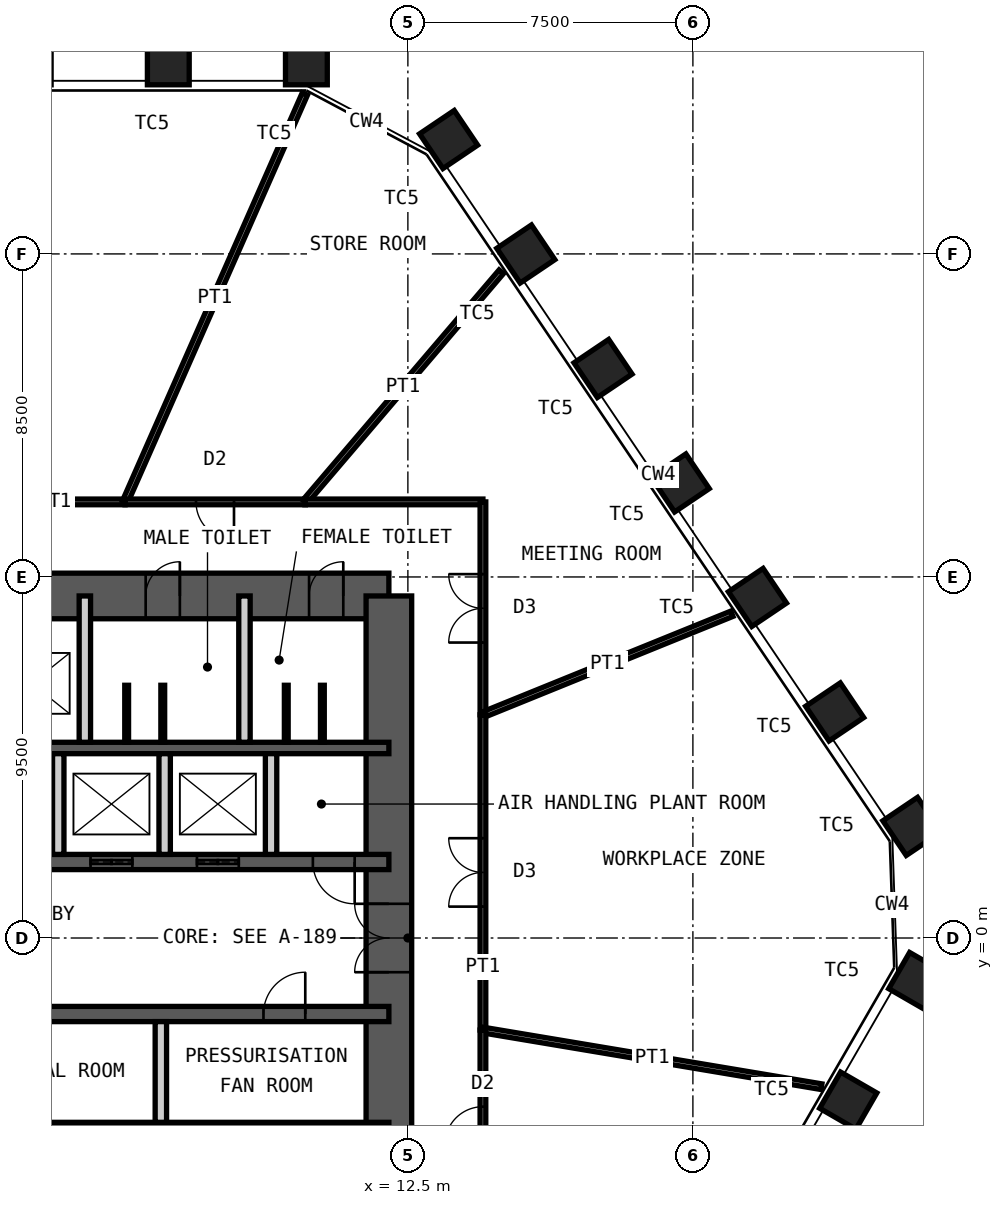
"""IFC4 building model, lengths in metres.
Left out: names, types, materials, properties, quantities, classifications, styles, units other than length and angle.
Written with IfcOpenShell. Run it as: python <this file> out.ifc"""

import sys

from ifc_helpers import new_model, si_unit, direction, frame, frame_2d, origin, origin_2d, place, context, subcontext, project, spatial, rectangle, hollow_rectangle, extrude, element, fill, save


model = new_model("IFC4")
c1 = context("Model", 3, precision=1e-05, world=origin(), true_north=direction((0.0, 1.0)))
c2 = subcontext(c1, "Body", "Model", "MODEL_VIEW")
j1 = project(units=[si_unit("LENGTHUNIT", "METRE"), si_unit("PLANEANGLEUNIT", "RADIAN")], contexts=[c1])
p1 = place(None, origin())
s1 = spatial("IfcSite", under=j1, at=p1, CompositionType="ELEMENT")
p2 = place(p1, origin())
s2 = spatial("IfcBuilding", under=s1, at=p2, CompositionType="ELEMENT")
p3 = place(p2, frame((0.0, 0.0, 184.6)))
s3 = spatial("IfcBuildingStorey", under=s2, at=p3, CompositionType="ELEMENT", Elevation=184.6)
for number, where, z_axis, x_axis in (
    (1, (6.196, 23.0, 0.0), (0.0, 0.0, 1.0), (-1.0, 0.0, 0.0)),
    (2, (9.829, 23.0, 0.0), (0.0, 0.0, 1.0), (-1.0, 0.0, 0.0)),
    (3, (13.571, 21.01, 0.0), (0.0, 0.0, 1.0), (-0.559, 0.829, 0.0)),
    (4, (15.603, 17.998, 0.0), (0.0, 0.0, 1.0), (-0.559, 0.829, 0.0)),
    (5, (17.635, 14.986, 0.0), (0.0, 0.0, 1.0), (-0.559, 0.829, 0.0)),
    (6, (19.667, 11.973, 0.0), (0.0, 0.0, 1.0), (-0.559, 0.829, 0.0)),
    (7, (21.699, 8.961, 0.0), (0.0, 0.0, 1.0), (-0.559, 0.829, 0.0)),
    (8, (23.731, 5.948, 0.0), (0.0, 0.0, 1.0), (-0.559, 0.829, 0.0)),
    (9, (25.762, 2.936, 0.0), (0.0, 0.0, 1.0), (-0.559, 0.829, 0.0)),
    (10, (25.905, -1.132, 0.0), (0.0, 0.0, 1.0), (0.5, 0.866, 0.0)),
    (11, (24.088, -4.279, 0.0), (0.0, 0.0, 1.0), (0.5, 0.866, 0.0)),
):
    element("IfcColumn", number, at=place(p3, frame(where, z_axis=z_axis, x_axis=x_axis)), inside=s3, PredefinedType="COLUMN", context=c2, shape_type="SweptSolid", body=[
        extrude(hollow_rectangle(XDim=1.1, YDim=1.1, WallThickness=0.07, at=origin_2d()), origin(), (0.0, 0.0, 1.0), 4.2),
    ])
p4 = place(p3, frame((-12.0, 9.0, 0.0), z_axis=(0.0, 0.0, 1.0), x_axis=(1.0, 0.0, 0.0)))
e12 = element("IfcWall", 12, at=p4, inside=s3, PredefinedType="SHEAR", context=c2, shape_type="SweptSolid", body=[
    extrude(rectangle(XDim=24.0, YDim=1.2, at=frame_2d((12.0, 0.0))), origin(), (0.0, 0.0, 1.0), 4.2),
])
p5 = place(p4, frame((10.4, 0.0, 0.0)))
e13 = element("IfcOpeningElement", 13, at=p5, cuts=e12, PredefinedType="OPENING", context=c2, shape_type="SweptSolid", body=[
    extrude(rectangle(XDim=1.0, YDim=2.1, at=frame_2d((0.5, 1.05))), frame((0.0, 0.61, 0.0), z_axis=(0.0, -1.0, 0.0), x_axis=(1.0, 0.0, 0.0)), (0.0, 0.0, 1.0), 1.22),
])
p6 = place(p4, frame((17.6, 0.0, 0.0)))
e14 = element("IfcOpeningElement", 14, at=p6, cuts=e12, PredefinedType="OPENING", context=c2, shape_type="SweptSolid", body=[
    extrude(rectangle(XDim=0.9, YDim=2.1, at=frame_2d((0.45, 1.05))), frame((0.0, 0.61, 0.0), z_axis=(0.0, -1.0, 0.0), x_axis=(1.0, 0.0, 0.0)), (0.0, 0.0, 1.0), 1.22),
])
p7 = place(p4, frame((21.9, 0.0, 0.0)))
e15 = element("IfcOpeningElement", 15, at=p7, cuts=e12, PredefinedType="OPENING", context=c2, shape_type="SweptSolid", body=[
    extrude(rectangle(XDim=0.9, YDim=2.1, at=frame_2d((0.45, 1.05))), frame((0.0, 0.61, 0.0), z_axis=(0.0, -1.0, 0.0), x_axis=(1.0, 0.0, 0.0)), (0.0, 0.0, 1.0), 1.22),
])
p8 = place(p3, frame((12.0, -9.0, 0.0), z_axis=(0.0, 0.0, 1.0), x_axis=(0.0, 1.0, 0.0)))
e16 = element("IfcWall", 16, at=p8, inside=s3, PredefinedType="SHEAR", context=c2, shape_type="SweptSolid", body=[
    extrude(rectangle(XDim=18.0, YDim=1.2, at=frame_2d((9.0, 0.0))), origin(), (0.0, 0.0, 1.0), 4.2),
])
p9 = place(p8, frame((8.1, 0.0, 0.0)))
e17 = element("IfcOpeningElement", 17, at=p9, cuts=e16, PredefinedType="OPENING", context=c2, shape_type="SweptSolid", body=[
    extrude(rectangle(XDim=1.8, YDim=2.1, at=frame_2d((0.9, 1.05))), frame((0.0, 0.61, 0.0), z_axis=(0.0, -1.0, 0.0), x_axis=(1.0, 0.0, 0.0)), (0.0, 0.0, 1.0), 1.22),
])
p10 = place(p3, frame((-12.0, 5.0, 0.0), z_axis=(0.0, 0.0, 1.0), x_axis=(1.0, 0.0, 0.0)))
e18 = element("IfcWall", 18, at=p10, inside=s3, PredefinedType="SHEAR", context=c2, shape_type="SweptSolid", body=[
    extrude(rectangle(XDim=24.0, YDim=0.3, at=frame_2d((12.0, 0.0))), origin(), (0.0, 0.0, 1.0), 4.2),
])
p11 = place(p3, frame((-12.0, 2.0, 0.0), z_axis=(0.0, 0.0, 1.0), x_axis=(1.0, 0.0, 0.0)))
e19 = element("IfcWall", 19, at=p11, inside=s3, PredefinedType="SHEAR", context=c2, shape_type="SweptSolid", body=[
    extrude(rectangle(XDim=24.0, YDim=0.4, at=frame_2d((12.0, 0.0))), origin(), (0.0, 0.0, 1.0), 4.2),
])
p12 = place(p11, frame((2.4, 0.0, 0.0)))
e20 = element("IfcOpeningElement", 20, at=p12, cuts=e19, PredefinedType="OPENING", context=c2, shape_type="SweptSolid", body=[
    extrude(rectangle(XDim=1.1, YDim=2.1, at=frame_2d((0.55, 1.05))), frame((0.0, 0.21, 0.0), z_axis=(0.0, -1.0, 0.0), x_axis=(1.0, 0.0, 0.0)), (0.0, 0.0, 1.0), 0.42),
])
p13 = place(p11, frame((22.0, 0.0, 0.0)))
e21 = element("IfcOpeningElement", 21, at=p13, cuts=e19, PredefinedType="OPENING", context=c2, shape_type="SweptSolid", body=[
    extrude(rectangle(XDim=1.1, YDim=2.1, at=frame_2d((0.55, 1.05))), frame((0.0, 0.21, 0.0), z_axis=(0.0, -1.0, 0.0), x_axis=(1.0, 0.0, 0.0)), (0.0, 0.0, 1.0), 0.42),
])
p14 = place(p11, frame((10.15, 0.0, 0.0)))
e22 = element("IfcOpeningElement", 22, at=p14, cuts=e19, PredefinedType="OPENING", context=c2, shape_type="SweptSolid", body=[
    extrude(rectangle(XDim=1.0, YDim=2.1, at=frame_2d((0.5, 1.05))), frame((0.0, 0.21, 0.0), z_axis=(0.0, -1.0, 0.0), x_axis=(1.0, 0.0, 0.0)), (0.0, 0.0, 1.0), 0.42),
])
p15 = place(p11, frame((6.9, 0.0, 0.0)))
e23 = element("IfcOpeningElement", 23, at=p15, cuts=e19, PredefinedType="OPENING", context=c2, shape_type="SweptSolid", body=[
    extrude(rectangle(XDim=1.0, YDim=2.1, at=frame_2d((0.5, 1.05))), frame((0.0, 0.21, 0.0), z_axis=(0.0, -1.0, 0.0), x_axis=(1.0, 0.0, 0.0)), (0.0, 0.0, 1.0), 0.42),
])
p16 = place(p11, frame((13.35, 0.0, 0.0)))
e24 = element("IfcOpeningElement", 24, at=p16, cuts=e19, PredefinedType="OPENING", context=c2, shape_type="SweptSolid", body=[
    extrude(rectangle(XDim=1.1, YDim=2.4, at=frame_2d((0.55, 1.2))), frame((0.0, 0.21, 0.0), z_axis=(0.0, -1.0, 0.0), x_axis=(1.0, 0.0, 0.0)), (0.0, 0.0, 1.0), 0.42),
])
p17 = place(p11, frame((16.15, 0.0, 0.0)))
e25 = element("IfcOpeningElement", 25, at=p17, cuts=e19, PredefinedType="OPENING", context=c2, shape_type="SweptSolid", body=[
    extrude(rectangle(XDim=1.1, YDim=2.4, at=frame_2d((0.55, 1.2))), frame((0.0, 0.21, 0.0), z_axis=(0.0, -1.0, 0.0), x_axis=(1.0, 0.0, 0.0)), (0.0, 0.0, 1.0), 0.42),
])
p18 = place(p11, frame((18.95, 0.0, 0.0)))
e26 = element("IfcOpeningElement", 26, at=p18, cuts=e19, PredefinedType="OPENING", context=c2, shape_type="SweptSolid", body=[
    extrude(rectangle(XDim=1.1, YDim=2.4, at=frame_2d((0.55, 1.2))), frame((0.0, 0.21, 0.0), z_axis=(0.0, -1.0, 0.0), x_axis=(1.0, 0.0, 0.0)), (0.0, 0.0, 1.0), 0.42),
])
p19 = place(p3, frame((-12.0, -2.0, 0.0), z_axis=(0.0, 0.0, 1.0), x_axis=(1.0, 0.0, 0.0)))
e27 = element("IfcWall", 27, at=p19, inside=s3, PredefinedType="SHEAR", context=c2, shape_type="SweptSolid", body=[
    extrude(rectangle(XDim=24.0, YDim=0.4, at=frame_2d((12.0, 0.0))), origin(), (0.0, 0.0, 1.0), 4.2),
])
p20 = place(p19, frame((1.1, 0.0, 0.0)))
e28 = element("IfcOpeningElement", 28, at=p20, cuts=e27, PredefinedType="OPENING", context=c2, shape_type="SweptSolid", body=[
    extrude(rectangle(XDim=1.1, YDim=2.1, at=frame_2d((0.55, 1.05))), frame((0.0, 0.21, 0.0), z_axis=(0.0, -1.0, 0.0), x_axis=(1.0, 0.0, 0.0)), (0.0, 0.0, 1.0), 0.42),
])
p21 = place(p19, frame((13.55, 0.0, 0.0)))
e29 = element("IfcOpeningElement", 29, at=p21, cuts=e27, PredefinedType="OPENING", context=c2, shape_type="SweptSolid", body=[
    extrude(rectangle(XDim=1.1, YDim=2.1, at=frame_2d((0.55, 1.05))), frame((0.0, 0.21, 0.0), z_axis=(0.0, -1.0, 0.0), x_axis=(1.0, 0.0, 0.0)), (0.0, 0.0, 1.0), 0.42),
])
p22 = place(p19, frame((20.7, 0.0, 0.0)))
e30 = element("IfcOpeningElement", 30, at=p22, cuts=e27, PredefinedType="OPENING", context=c2, shape_type="SweptSolid", body=[
    extrude(rectangle(XDim=1.1, YDim=2.1, at=frame_2d((0.55, 1.05))), frame((0.0, 0.21, 0.0), z_axis=(0.0, -1.0, 0.0), x_axis=(1.0, 0.0, 0.0)), (0.0, 0.0, 1.0), 0.42),
])
p23 = place(p19, frame((4.0, 0.0, 0.0)))
e31 = element("IfcOpeningElement", 31, at=p23, cuts=e27, PredefinedType="OPENING", context=c2, shape_type="SweptSolid", body=[
    extrude(rectangle(XDim=1.0, YDim=2.1, at=frame_2d((0.5, 1.05))), frame((0.0, 0.21, 0.0), z_axis=(0.0, -1.0, 0.0), x_axis=(1.0, 0.0, 0.0)), (0.0, 0.0, 1.0), 0.42),
])
p24 = place(p3, frame((-12.0, -5.0, 0.0), z_axis=(0.0, 0.0, 1.0), x_axis=(1.0, 0.0, 0.0)))
e32 = element("IfcWall", 32, at=p24, inside=s3, PredefinedType="SHEAR", context=c2, shape_type="SweptSolid", body=[
    extrude(rectangle(XDim=24.0, YDim=0.3, at=frame_2d((12.0, 0.0))), origin(), (0.0, 0.0, 1.0), 4.2),
])
for number, where, z_axis, x_axis in (
    (33, (4.0, 5.15, 0.0), (0.0, 0.0, 1.0), (0.0, 1.0, 0.0)),
    (34, (8.2, 5.15, 0.0), (0.0, 0.0, 1.0), (0.0, 1.0, 0.0)),
):
    element("IfcWall", number, at=place(p3, frame(where, z_axis=z_axis, x_axis=x_axis)), inside=s3, PredefinedType="PARTITIONING", context=c2, shape_type="SweptSolid", body=[
        extrude(rectangle(XDim=3.85, YDim=0.3, at=frame_2d((1.925, 0.0))), origin(), (0.0, 0.0, 1.0), 3.98),
    ])
for number, where, z_axis, x_axis in (
    (35, (3.3, 2.2, 0.0), (0.0, 0.0, 1.0), (0.0, 1.0, 0.0)),
    (36, (6.1, 2.2, 0.0), (0.0, 0.0, 1.0), (0.0, 1.0, 0.0)),
    (37, (8.9, 2.2, 0.0), (0.0, 0.0, 1.0), (0.0, 1.0, 0.0)),
    (38, (6.0, -4.85, 0.0), (0.0, 0.0, 1.0), (0.0, 1.0, 0.0)),
):
    element("IfcWall", number, at=place(p3, frame(where, z_axis=z_axis, x_axis=x_axis)), inside=s3, PredefinedType="PARTITIONING", context=c2, shape_type="SweptSolid", body=[
        extrude(rectangle(XDim=2.65, YDim=0.3, at=frame_2d((1.325, 0.0))), origin(), (0.0, 0.0, 1.0), 3.98),
    ])
for number, where, z_axis, x_axis in (
    (39, (5.1, 5.15, 0.0), (0.0, 0.0, 1.0), (0.0, 1.0, 0.0)),
    (40, (6.05, 5.15, 0.0), (0.0, 0.0, 1.0), (0.0, 1.0, 0.0)),
    (41, (9.3, 5.15, 0.0), (0.0, 0.0, 1.0), (0.0, 1.0, 0.0)),
    (42, (10.25, 5.15, 0.0), (0.0, 0.0, 1.0), (0.0, 1.0, 0.0)),
):
    element("IfcWall", number, at=place(p3, frame(where, z_axis=z_axis, x_axis=x_axis)), inside=s3, PredefinedType="PARTITIONING", context=c2, shape_type="SweptSolid", body=[
        extrude(rectangle(XDim=1.5, YDim=0.1, at=frame_2d((0.75, 0.0))), origin(), (0.0, 0.0, 1.0), 2.1),
    ])
p25 = place(p3, frame((-4.291, 11.475, 0.0), z_axis=(0.0, 0.0, 1.0), x_axis=(1.0, 0.0, 0.0)))
e43 = element("IfcWall", 43, at=p25, inside=s3, PredefinedType="PARTITIONING", context=c2, shape_type="SweptSolid", body=[
    extrude(rectangle(XDim=9.349, YDim=0.15, at=frame_2d((4.674, 0.0))), origin(), (0.0, 0.0, 1.0), 4.03),
])
p26 = place(p25, frame((3.774, 0.0, 0.0)))
e44 = element("IfcOpeningElement", 44, at=p26, cuts=e43, PredefinedType="OPENING", context=c2, shape_type="SweptSolid", body=[
    extrude(rectangle(XDim=1.8, YDim=2.4, at=frame_2d((0.9, 1.2))), frame((0.0, 0.085, 0.0), z_axis=(0.0, -1.0, 0.0), x_axis=(1.0, 0.0, 0.0)), (0.0, 0.0, 1.0), 0.17),
])
p27 = place(p3, frame((9.789, 22.208, 0.0), z_axis=(0.0, 0.0, 1.0), x_axis=(-0.403346052835, -0.9150475188, 0.0)))
e45 = element("IfcWall", 45, at=p27, inside=s3, PredefinedType="PARTITIONING", context=c2, shape_type="SweptSolid", body=[
    extrude(rectangle(XDim=11.73, YDim=0.15, at=frame_2d((5.865, 0.0))), origin(), (0.0, 0.0, 1.0), 2.93),
])
p28 = place(p3, frame((5.058, 11.475, 0.0), z_axis=(0.0, 0.0, 1.0), x_axis=(1.0, 0.0, 0.0)))
e46 = element("IfcWall", 46, at=p28, inside=s3, PredefinedType="PARTITIONING", context=c2, shape_type="SweptSolid", body=[
    extrude(rectangle(XDim=4.733, YDim=0.15, at=frame_2d((2.367, 0.0))), origin(), (0.0, 0.0, 1.0), 4.03),
])
p29 = place(p28, frame((1.867, 0.0, 0.0)))
e47 = element("IfcOpeningElement", 47, at=p29, cuts=e46, PredefinedType="OPENING", context=c2, shape_type="SweptSolid", body=[
    extrude(rectangle(XDim=1.0, YDim=2.4, at=frame_2d((0.5, 1.2))), frame((0.0, 0.085, 0.0), z_axis=(0.0, -1.0, 0.0), x_axis=(1.0, 0.0, 0.0)), (0.0, 0.0, 1.0), 0.17),
])
p30 = place(p3, frame((14.958, 17.531, 0.0), z_axis=(0.0, 0.0, 1.0), x_axis=(-0.649097500837, -0.760705221756, 0.0)))
e48 = element("IfcWall", 48, at=p30, inside=s3, PredefinedType="PARTITIONING", context=c2, shape_type="SweptSolid", body=[
    extrude(rectangle(XDim=7.96, YDim=0.15, at=frame_2d((3.98, 0.0))), origin(), (0.0, 0.0, 1.0), 3.43),
])
p31 = place(p3, frame((9.791, 11.475, 0.0), z_axis=(0.0, 0.0, 1.0), x_axis=(1.0, 0.0, 0.0)))
e49 = element("IfcWall", 49, at=p31, inside=s3, PredefinedType="PARTITIONING", context=c2, shape_type="SweptSolid", body=[
    extrude(rectangle(XDim=4.684, YDim=0.15, at=frame_2d((2.342, 0.0))), origin(), (0.0, 0.0, 1.0), 4.03),
])
p32 = place(p3, frame((14.475, 11.475, 0.0), z_axis=(0.0, 0.0, 1.0), x_axis=(0.0, -1.0, 0.0)))
e50 = element("IfcWall", 50, at=p32, inside=s3, PredefinedType="PARTITIONING", context=c2, shape_type="SweptSolid", body=[
    extrude(rectangle(XDim=5.601, YDim=0.15, at=frame_2d((2.801, 0.0))), origin(), (0.0, 0.0, 1.0), 4.03),
])
p33 = place(p32, frame((1.901, 0.0, 0.0)))
e51 = element("IfcOpeningElement", 51, at=p33, cuts=e50, PredefinedType="OPENING", context=c2, shape_type="SweptSolid", body=[
    extrude(rectangle(XDim=1.8, YDim=2.4, at=frame_2d((0.9, 1.2))), frame((0.0, 0.085, 0.0), z_axis=(0.0, -1.0, 0.0), x_axis=(1.0, 0.0, 0.0)), (0.0, 0.0, 1.0), 0.17),
])
p34 = place(p3, frame((21.026, 8.532, 0.0), z_axis=(0.0, 0.0, 1.0), x_axis=(-0.926617028548, -0.376006492503, 0.0)))
e52 = element("IfcWall", 52, at=p34, inside=s3, PredefinedType="PARTITIONING", context=c2, shape_type="SweptSolid", body=[
    extrude(rectangle(XDim=7.07, YDim=0.15, at=frame_2d((3.535, 0.0))), origin(), (0.0, 0.0, 1.0), 3.43),
])
p35 = place(p3, frame((14.475, 5.874, 0.0), z_axis=(0.0, 0.0, 1.0), x_axis=(0.0, -1.0, 0.0)))
e53 = element("IfcWall", 53, at=p35, inside=s3, PredefinedType="PARTITIONING", context=c2, shape_type="SweptSolid", body=[
    extrude(rectangle(XDim=8.296, YDim=0.15, at=frame_2d((4.148, 0.0))), origin(), (0.0, 0.0, 1.0), 4.03),
])
p36 = place(p35, frame((3.248, 0.0, 0.0)))
e54 = element("IfcOpeningElement", 54, at=p36, cuts=e53, PredefinedType="OPENING", context=c2, shape_type="SweptSolid", body=[
    extrude(rectangle(XDim=1.8, YDim=2.4, at=frame_2d((0.9, 1.2))), frame((0.0, 0.085, 0.0), z_axis=(0.0, -1.0, 0.0), x_axis=(1.0, 0.0, 0.0)), (0.0, 0.0, 1.0), 0.17),
])
p37 = place(p3, frame((23.383, -3.912, 0.0), z_axis=(0.0, 0.0, 1.0), x_axis=(-0.986293651891, 0.164999491631, 0.0)))
e55 = element("IfcWall", 55, at=p37, inside=s3, PredefinedType="PARTITIONING", context=c2, shape_type="SweptSolid", body=[
    extrude(rectangle(XDim=9.032, YDim=0.15, at=frame_2d((4.516, 0.0))), origin(), (0.0, 0.0, 1.0), 3.43),
])
p38 = place(p3, frame((14.475, -2.422, 0.0), z_axis=(0.0, 0.0, 1.0), x_axis=(0.0, -1.0, 0.0)))
e56 = element("IfcWall", 56, at=p38, inside=s3, PredefinedType="PARTITIONING", context=c2, shape_type="SweptSolid", body=[
    extrude(rectangle(XDim=5.033, YDim=0.15, at=frame_2d((2.517, 0.0))), origin(), (0.0, 0.0, 1.0), 4.03),
])
p39 = place(p38, frame((2.017, 0.0, 0.0)))
e57 = element("IfcOpeningElement", 57, at=p39, cuts=e56, PredefinedType="OPENING", context=c2, shape_type="SweptSolid", body=[
    extrude(rectangle(XDim=1.0, YDim=2.4, at=frame_2d((0.5, 1.2))), frame((0.0, 0.085, 0.0), z_axis=(0.0, -1.0, 0.0), x_axis=(1.0, 0.0, 0.0)), (0.0, 0.0, 1.0), 0.17),
])
p40 = place(p6, origin())
e58 = element("IfcDoor", 58, at=p40, inside=s3, OperationType="SINGLE_SWING_LEFT", PredefinedType="DOOR", context=c2, shape_type="SweptSolid", body=[
    extrude(rectangle(XDim=0.9, YDim=2.1, at=frame_2d((0.45, 1.05))), frame((0.0, 0.025, 0.0), z_axis=(0.0, -1.0, 0.0), x_axis=(1.0, 0.0, 0.0)), (0.0, 0.0, 1.0), 0.05),
])
fill(e14, e58)
p41 = place(p7, origin())
e59 = element("IfcDoor", 59, at=p41, inside=s3, OperationType="SINGLE_SWING_LEFT", PredefinedType="DOOR", context=c2, shape_type="SweptSolid", body=[
    extrude(rectangle(XDim=0.9, YDim=2.1, at=frame_2d((0.45, 1.05))), frame((0.0, 0.025, 0.0), z_axis=(0.0, -1.0, 0.0), x_axis=(1.0, 0.0, 0.0)), (0.0, 0.0, 1.0), 0.05),
])
fill(e15, e59)
p42 = place(p13, origin())
e60 = element("IfcDoor", 60, at=p42, inside=s3, OperationType="SINGLE_SWING_RIGHT", PredefinedType="DOOR", context=c2, shape_type="SweptSolid", body=[
    extrude(rectangle(XDim=1.1, YDim=2.1, at=frame_2d((0.55, 1.05))), frame((0.0, 0.025, 0.0), z_axis=(0.0, -1.0, 0.0), x_axis=(1.0, 0.0, 0.0)), (0.0, 0.0, 1.0), 0.05),
])
fill(e21, e60)
p43 = place(p22, origin())
e61 = element("IfcDoor", 61, at=p43, inside=s3, OperationType="SINGLE_SWING_LEFT", PredefinedType="DOOR", context=c2, shape_type="SweptSolid", body=[
    extrude(rectangle(XDim=1.1, YDim=2.1, at=frame_2d((0.55, 1.05))), frame((0.0, 0.025, 0.0), z_axis=(0.0, -1.0, 0.0), x_axis=(1.0, 0.0, 0.0)), (0.0, 0.0, 1.0), 0.05),
])
fill(e30, e61)
p44 = place(p9, origin())
e62 = element("IfcDoor", 62, at=p44, inside=s3, OperationType="DOUBLE_DOOR_DOUBLE_SWING", PredefinedType="DOOR", context=c2, shape_type="SweptSolid", body=[
    extrude(rectangle(XDim=1.8, YDim=2.1, at=frame_2d((0.9, 1.05))), frame((0.0, 0.025, 0.0), z_axis=(0.0, -1.0, 0.0), x_axis=(1.0, 0.0, 0.0)), (0.0, 0.0, 1.0), 0.05),
])
fill(e17, e62)
p45 = place(p17, origin())
e63 = element("IfcDoor", 63, at=p45, inside=s3, OperationType="DOUBLE_DOOR_SLIDING", PredefinedType="DOOR", context=c2, shape_type="SweptSolid", body=[
    extrude(rectangle(XDim=1.1, YDim=2.4, at=frame_2d((0.55, 1.2))), frame((0.0, 0.025, 0.0), z_axis=(0.0, -1.0, 0.0), x_axis=(1.0, 0.0, 0.0)), (0.0, 0.0, 1.0), 0.05),
])
fill(e25, e63)
p46 = place(p18, origin())
e64 = element("IfcDoor", 64, at=p46, inside=s3, OperationType="DOUBLE_DOOR_SLIDING", PredefinedType="DOOR", context=c2, shape_type="SweptSolid", body=[
    extrude(rectangle(XDim=1.1, YDim=2.4, at=frame_2d((0.55, 1.2))), frame((0.0, 0.025, 0.0), z_axis=(0.0, -1.0, 0.0), x_axis=(1.0, 0.0, 0.0)), (0.0, 0.0, 1.0), 0.05),
])
fill(e26, e64)
p47 = place(p29, origin())
e65 = element("IfcDoor", 65, at=p47, inside=s3, OperationType="SINGLE_SWING_RIGHT", PredefinedType="DOOR", context=c2, shape_type="SweptSolid", body=[
    extrude(rectangle(XDim=1.0, YDim=2.4, at=frame_2d((0.5, 1.2))), frame((0.0, 0.025, 0.0), z_axis=(0.0, -1.0, 0.0), x_axis=(1.0, 0.0, 0.0)), (0.0, 0.0, 1.0), 0.05),
])
fill(e47, e65)
p48 = place(p33, origin())
e66 = element("IfcDoor", 66, at=p48, inside=s3, OperationType="DOUBLE_DOOR_DOUBLE_SWING", PredefinedType="DOOR", context=c2, shape_type="SweptSolid", body=[
    extrude(rectangle(XDim=1.8, YDim=2.4, at=frame_2d((0.9, 1.2))), frame((0.0, 0.025, 0.0), z_axis=(0.0, -1.0, 0.0), x_axis=(1.0, 0.0, 0.0)), (0.0, 0.0, 1.0), 0.05),
])
fill(e51, e66)
p49 = place(p36, origin())
e67 = element("IfcDoor", 67, at=p49, inside=s3, OperationType="DOUBLE_DOOR_DOUBLE_SWING", PredefinedType="DOOR", context=c2, shape_type="SweptSolid", body=[
    extrude(rectangle(XDim=1.8, YDim=2.4, at=frame_2d((0.9, 1.2))), frame((0.0, 0.025, 0.0), z_axis=(0.0, -1.0, 0.0), x_axis=(1.0, 0.0, 0.0)), (0.0, 0.0, 1.0), 0.05),
])
fill(e54, e67)
p50 = place(p39, origin())
e68 = element("IfcDoor", 68, at=p50, inside=s3, OperationType="SINGLE_SWING_RIGHT", PredefinedType="DOOR", context=c2, shape_type="SweptSolid", body=[
    extrude(rectangle(XDim=1.0, YDim=2.4, at=frame_2d((0.5, 1.2))), frame((0.0, 0.025, 0.0), z_axis=(0.0, -1.0, 0.0), x_axis=(1.0, 0.0, 0.0)), (0.0, 0.0, 1.0), 0.05),
])
fill(e57, e68)
save(model, sys.argv[1])
